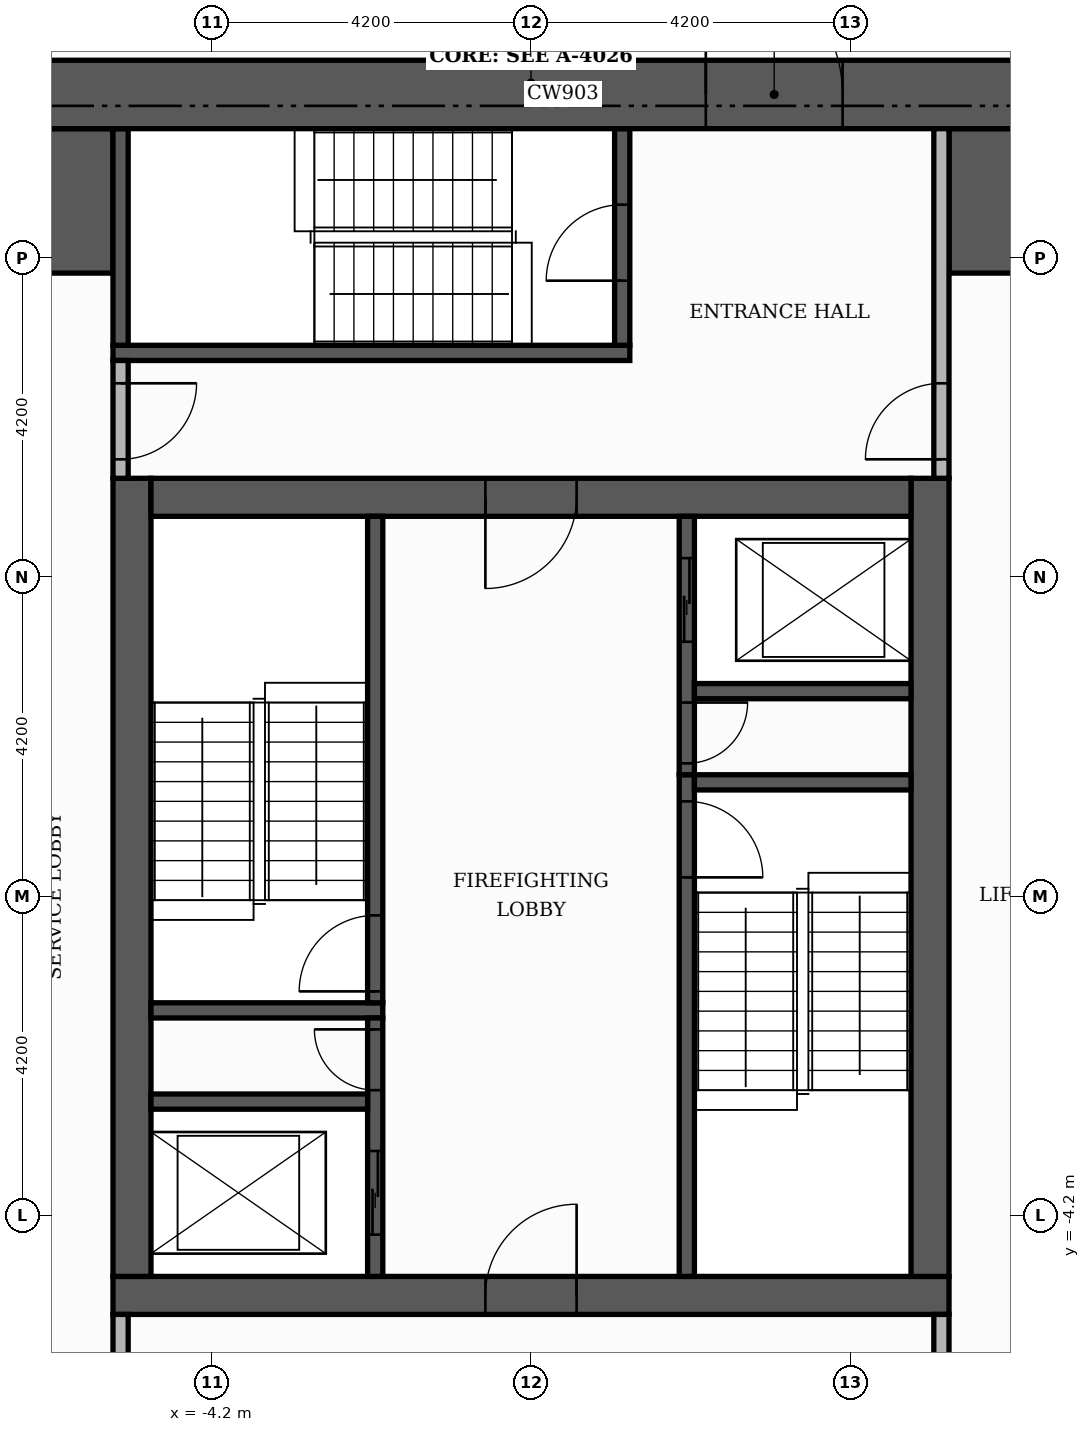
"""IFC4 building model, lengths in metres.
Left out: names, types, materials, properties, quantities, classifications, styles, units other than length and angle.
Written with IfcOpenShell. Run it as: python <this file> out.ifc"""

import sys

from ifc_helpers import new_model, si_unit, direction, frame, frame_2d, origin, place, context, subcontext, project, spatial, rectangle, extrude, element, fill, save


model = new_model("IFC4")
c1 = context("Model", 3, precision=1e-05, world=origin(), true_north=direction((0.0, 1.0)))
c2 = subcontext(c1, "Body", "Model", "MODEL_VIEW")
j1 = project(units=[si_unit("LENGTHUNIT", "METRE"), si_unit("PLANEANGLEUNIT", "RADIAN")], contexts=[c1])
p1 = place(None, origin())
s1 = spatial("IfcSite", under=j1, at=p1, CompositionType="ELEMENT")
p2 = place(p1, origin())
s2 = spatial("IfcBuilding", under=s1, at=p2, CompositionType="ELEMENT")
p3 = place(p2, frame((0.0, 0.0, 157.2)))
s3 = spatial("IfcBuildingStorey", under=s2, at=p3, CompositionType="ELEMENT", Elevation=157.2)
p4 = place(p3, frame((-5.5, -5.25, 0.0), z_axis=(0.0, 0.0, 1.0), x_axis=(1.0, 0.0, 0.0)))
e1 = element("IfcWall", 1, at=p4, inside=s3, PredefinedType="SHEAR", context=c2, shape_type="SweptSolid", body=[
    extrude(rectangle(XDim=11.0, YDim=0.5, at=frame_2d((5.5, 0.0))), origin(), (0.0, 0.0, 1.0), 3.48),
])
p5 = place(p4, frame((4.9, 0.0, 0.0)))
e2 = element("IfcOpeningElement", 2, at=p5, cuts=e1, PredefinedType="OPENING", context=c2, shape_type="SweptSolid", body=[
    extrude(rectangle(XDim=1.2, YDim=2.1, at=frame_2d((0.6, 1.05))), frame((0.0, 0.26, 0.0), z_axis=(0.0, -1.0, 0.0), x_axis=(1.0, 0.0, 0.0)), (0.0, 0.0, 1.0), 0.52),
])
for number, where, z_axis, x_axis in (
    (3, (-5.25, -5.0, 0.0), (0.0, 0.0, 1.0), (0.0, 1.0, 0.0)),
    (4, (5.25, -5.0, 0.0), (0.0, 0.0, 1.0), (0.0, 1.0, 0.0)),
):
    element("IfcWall", number, at=place(p3, frame(where, z_axis=z_axis, x_axis=x_axis)), inside=s3, PredefinedType="SHEAR", context=c2, shape_type="SweptSolid", body=[
        extrude(rectangle(XDim=10.5, YDim=0.5, at=frame_2d((5.25, 0.0))), origin(), (0.0, 0.0, 1.0), 3.48),
    ])
p6 = place(p3, frame((-5.0, 5.25, 0.0), z_axis=(0.0, 0.0, 1.0), x_axis=(1.0, 0.0, 0.0)))
e5 = element("IfcWall", 5, at=p6, inside=s3, PredefinedType="SHEAR", context=c2, shape_type="SweptSolid", body=[
    extrude(rectangle(XDim=10.0, YDim=0.5, at=frame_2d((5.0, 0.0))), origin(), (0.0, 0.0, 1.0), 3.48),
])
p7 = place(p6, frame((4.4, 0.0, 0.0)))
e6 = element("IfcOpeningElement", 6, at=p7, cuts=e5, PredefinedType="OPENING", context=c2, shape_type="SweptSolid", body=[
    extrude(rectangle(XDim=1.2, YDim=2.1, at=frame_2d((0.6, 1.05))), frame((0.0, 0.26, 0.0), z_axis=(0.0, -1.0, 0.0), x_axis=(1.0, 0.0, 0.0)), (0.0, 0.0, 1.0), 0.52),
])
for number, where, z_axis, x_axis in (
    (7, (-10.1, 9.15, 0.0), (0.0, 0.0, 1.0), (1.0, 0.0, 0.0)),
    (8, (5.5, 9.15, 0.0), (0.0, 0.0, 1.0), (1.0, 0.0, 0.0)),
):
    element("IfcWall", number, at=place(p3, frame(where, z_axis=z_axis, x_axis=x_axis)), inside=s3, PredefinedType="SHEAR", context=c2, shape_type="SweptSolid", body=[
        extrude(rectangle(XDim=4.6, YDim=1.9, at=frame_2d((2.3, 0.0))), origin(), (0.0, 0.0, 1.0), 3.48),
    ])
p8 = place(p3, frame((2.05, -5.0, 0.0), z_axis=(0.0, 0.0, 1.0), x_axis=(0.0, 1.0, 0.0)))
e9 = element("IfcWall", 9, at=p8, inside=s3, PredefinedType="SHEAR", context=c2, shape_type="SweptSolid", body=[
    extrude(rectangle(XDim=6.6, YDim=0.2, at=frame_2d((3.3, 0.0))), origin(), (0.0, 0.0, 1.0), 3.48),
])
p9 = place(p8, frame((5.25, 0.0, 0.0)))
e10 = element("IfcOpeningElement", 10, at=p9, cuts=e9, PredefinedType="OPENING", context=c2, shape_type="SweptSolid", body=[
    extrude(rectangle(XDim=1.0, YDim=2.1, at=frame_2d((0.5, 1.05))), frame((0.0, 0.11, 0.0), z_axis=(0.0, -1.0, 0.0), x_axis=(1.0, 0.0, 0.0)), (0.0, 0.0, 1.0), 0.22),
])
p10 = place(p3, frame((-5.0, -1.5, 0.0), z_axis=(0.0, 0.0, 1.0), x_axis=(1.0, 0.0, 0.0)))
e11 = element("IfcWall", 11, at=p10, inside=s3, PredefinedType="SHEAR", context=c2, shape_type="SweptSolid", body=[
    extrude(rectangle(XDim=3.05, YDim=0.2, at=frame_2d((1.525, 0.0))), origin(), (0.0, 0.0, 1.0), 3.48),
])
p11 = place(p3, frame((-2.05, -1.4, 0.0), z_axis=(0.0, 0.0, 1.0), x_axis=(0.0, 1.0, 0.0)))
e12 = element("IfcWall", 12, at=p11, inside=s3, PredefinedType="SHEAR", context=c2, shape_type="SweptSolid", body=[
    extrude(rectangle(XDim=6.4, YDim=0.2, at=frame_2d((3.2, 0.0))), origin(), (0.0, 0.0, 1.0), 3.48),
])
p12 = place(p11, frame((0.15, 0.0, 0.0)))
e13 = element("IfcOpeningElement", 13, at=p12, cuts=e12, PredefinedType="OPENING", context=c2, shape_type="SweptSolid", body=[
    extrude(rectangle(XDim=1.0, YDim=2.1, at=frame_2d((0.5, 1.05))), frame((0.0, 0.11, 0.0), z_axis=(0.0, -1.0, 0.0), x_axis=(1.0, 0.0, 0.0)), (0.0, 0.0, 1.0), 0.22),
])
p13 = place(p3, frame((2.15, 1.5, 0.0), z_axis=(0.0, 0.0, 1.0), x_axis=(1.0, 0.0, 0.0)))
e14 = element("IfcWall", 14, at=p13, inside=s3, PredefinedType="SHEAR", context=c2, shape_type="SweptSolid", body=[
    extrude(rectangle(XDim=2.85, YDim=0.2, at=frame_2d((1.425, 0.0))), origin(), (0.0, 0.0, 1.0), 3.48),
])
p14 = place(p3, frame((-5.5, 7.15, 0.0), z_axis=(0.0, 0.0, 1.0), x_axis=(1.0, 0.0, 0.0)))
e15 = element("IfcWall", 15, at=p14, inside=s3, PredefinedType="SHEAR", context=c2, shape_type="SweptSolid", body=[
    extrude(rectangle(XDim=6.8, YDim=0.2, at=frame_2d((3.4, 0.0))), origin(), (0.0, 0.0, 1.0), 3.48),
])
p15 = place(p3, frame((-5.4, 7.25, 0.0), z_axis=(0.0, 0.0, 1.0), x_axis=(0.0, 1.0, 0.0)))
e16 = element("IfcWall", 16, at=p15, inside=s3, PredefinedType="SHEAR", context=c2, shape_type="SweptSolid", body=[
    extrude(rectangle(XDim=2.85, YDim=0.2, at=frame_2d((1.425, 0.0))), origin(), (0.0, 0.0, 1.0), 3.48),
])
p16 = place(p3, frame((1.2, 7.25, 0.0), z_axis=(0.0, 0.0, 1.0), x_axis=(0.0, 1.0, 0.0)))
e17 = element("IfcWall", 17, at=p16, inside=s3, PredefinedType="SHEAR", context=c2, shape_type="SweptSolid", body=[
    extrude(rectangle(XDim=2.85, YDim=0.2, at=frame_2d((1.425, 0.0))), origin(), (0.0, 0.0, 1.0), 3.48),
])
p17 = place(p16, frame((0.85, 0.0, 0.0)))
e18 = element("IfcOpeningElement", 18, at=p17, cuts=e17, PredefinedType="OPENING", context=c2, shape_type="SweptSolid", body=[
    extrude(rectangle(XDim=1.0, YDim=2.1, at=frame_2d((0.5, 1.05))), frame((0.0, 0.11, 0.0), z_axis=(0.0, -1.0, 0.0), x_axis=(1.0, 0.0, 0.0)), (0.0, 0.0, 1.0), 0.22),
])
p18 = place(p3, frame((-2.05, -5.0, 0.0), z_axis=(0.0, 0.0, 1.0), x_axis=(0.0, 1.0, 0.0)))
e19 = element("IfcWall", 19, at=p18, inside=s3, PredefinedType="SHEAR", context=c2, shape_type="SweptSolid", body=[
    extrude(rectangle(XDim=3.4, YDim=0.2, at=frame_2d((1.7, 0.0))), origin(), (0.0, 0.0, 1.0), 3.48),
])
p19 = place(p18, frame((0.55, 0.0, 0.0)))
e20 = element("IfcOpeningElement", 20, at=p19, cuts=e19, PredefinedType="OPENING", context=c2, shape_type="SweptSolid", body=[
    extrude(rectangle(XDim=1.1, YDim=2.1, at=frame_2d((0.55, 1.05))), frame((0.0, 0.11, 0.0), z_axis=(0.0, -1.0, 0.0), x_axis=(1.0, 0.0, 0.0)), (0.0, 0.0, 1.0), 0.22),
])
p20 = place(p18, frame((2.45, 0.0, 0.0)))
e21 = element("IfcOpeningElement", 21, at=p20, cuts=e19, PredefinedType="OPENING", context=c2, shape_type="SweptSolid", body=[
    extrude(rectangle(XDim=0.8, YDim=2.1, at=frame_2d((0.4, 1.05))), frame((0.0, 0.11, 0.0), z_axis=(0.0, -1.0, 0.0), x_axis=(1.0, 0.0, 0.0)), (0.0, 0.0, 1.0), 0.22),
])
p21 = place(p3, frame((-5.0, -2.7, 0.0), z_axis=(0.0, 0.0, 1.0), x_axis=(1.0, 0.0, 0.0)))
e22 = element("IfcWall", 22, at=p21, inside=s3, PredefinedType="SHEAR", context=c2, shape_type="SweptSolid", body=[
    extrude(rectangle(XDim=2.85, YDim=0.2, at=frame_2d((1.425, 0.0))), origin(), (0.0, 0.0, 1.0), 3.48),
])
p22 = place(p3, frame((2.05, 1.6, 0.0), z_axis=(0.0, 0.0, 1.0), x_axis=(0.0, 1.0, 0.0)))
e23 = element("IfcWall", 23, at=p22, inside=s3, PredefinedType="SHEAR", context=c2, shape_type="SweptSolid", body=[
    extrude(rectangle(XDim=3.4, YDim=0.2, at=frame_2d((1.7, 0.0))), origin(), (0.0, 0.0, 1.0), 3.48),
])
p23 = place(p22, frame((1.75, 0.0, 0.0)))
e24 = element("IfcOpeningElement", 24, at=p23, cuts=e23, PredefinedType="OPENING", context=c2, shape_type="SweptSolid", body=[
    extrude(rectangle(XDim=1.1, YDim=2.1, at=frame_2d((0.55, 1.05))), frame((0.0, 0.11, 0.0), z_axis=(0.0, -1.0, 0.0), x_axis=(1.0, 0.0, 0.0)), (0.0, 0.0, 1.0), 0.22),
])
p24 = place(p22, frame((0.15, 0.0, 0.0)))
e25 = element("IfcOpeningElement", 25, at=p24, cuts=e23, PredefinedType="OPENING", context=c2, shape_type="SweptSolid", body=[
    extrude(rectangle(XDim=0.8, YDim=2.1, at=frame_2d((0.4, 1.05))), frame((0.0, 0.11, 0.0), z_axis=(0.0, -1.0, 0.0), x_axis=(1.0, 0.0, 0.0)), (0.0, 0.0, 1.0), 0.22),
])
p25 = place(p3, frame((2.15, 2.7, 0.0), z_axis=(0.0, 0.0, 1.0), x_axis=(1.0, 0.0, 0.0)))
e26 = element("IfcWall", 26, at=p25, inside=s3, PredefinedType="SHEAR", context=c2, shape_type="SweptSolid", body=[
    extrude(rectangle(XDim=2.85, YDim=0.2, at=frame_2d((1.425, 0.0))), origin(), (0.0, 0.0, 1.0), 3.48),
])
p26 = place(p3, frame((-11.0, 10.55, 0.0), z_axis=(0.0, 0.0, 1.0), x_axis=(1.0, 0.0, 0.0)))
e27 = element("IfcWall", 27, at=p26, inside=s3, PredefinedType="SHEAR", context=c2, shape_type="SweptSolid", body=[
    extrude(rectangle(XDim=22.0, YDim=0.9, at=frame_2d((11.0, 0.0))), origin(), (0.0, 0.0, 1.0), 3.48),
])
p27 = place(p26, frame((13.3, 0.0, 0.0)))
e28 = element("IfcOpeningElement", 28, at=p27, cuts=e27, PredefinedType="OPENING", context=c2, shape_type="SweptSolid", body=[
    extrude(rectangle(XDim=1.8, YDim=2.2, at=frame_2d((0.9, 1.1))), frame((0.0, 0.46, 0.0), z_axis=(0.0, -1.0, 0.0), x_axis=(1.0, 0.0, 0.0)), (0.0, 0.0, 1.0), 0.92),
])
p28 = place(p3, frame((-5.4, -10.1, 0.0), z_axis=(0.0, 0.0, 1.0), x_axis=(0.0, 1.0, 0.0)))
e29 = element("IfcWall", 29, at=p28, inside=s3, PredefinedType="PARTITIONING", context=c2, shape_type="SweptSolid", body=[
    extrude(rectangle(XDim=4.6, YDim=0.2, at=frame_2d((2.3, 0.0))), origin(), (0.0, 0.0, 1.0), 3.48),
])
p29 = place(p28, frame((2.9, 0.0, 0.0)))
e30 = element("IfcOpeningElement", 30, at=p29, cuts=e29, PredefinedType="OPENING", context=c2, shape_type="SweptSolid", body=[
    extrude(rectangle(XDim=1.0, YDim=2.1, at=frame_2d((0.5, 1.05))), frame((0.0, 0.11, 0.0), z_axis=(0.0, -1.0, 0.0), x_axis=(1.0, 0.0, 0.0)), (0.0, 0.0, 1.0), 0.22),
])
p30 = place(p3, frame((5.4, -10.1, 0.0), z_axis=(0.0, 0.0, 1.0), x_axis=(0.0, 1.0, 0.0)))
e31 = element("IfcWall", 31, at=p30, inside=s3, PredefinedType="PARTITIONING", context=c2, shape_type="SweptSolid", body=[
    extrude(rectangle(XDim=4.6, YDim=0.2, at=frame_2d((2.3, 0.0))), origin(), (0.0, 0.0, 1.0), 3.48),
])
p31 = place(p30, frame((2.9, 0.0, 0.0)))
e32 = element("IfcOpeningElement", 32, at=p31, cuts=e31, PredefinedType="OPENING", context=c2, shape_type="SweptSolid", body=[
    extrude(rectangle(XDim=1.0, YDim=2.1, at=frame_2d((0.5, 1.05))), frame((0.0, 0.11, 0.0), z_axis=(0.0, -1.0, 0.0), x_axis=(1.0, 0.0, 0.0)), (0.0, 0.0, 1.0), 0.22),
])
p32 = place(p3, frame((-5.4, 5.5, 0.0), z_axis=(0.0, 0.0, 1.0), x_axis=(0.0, 1.0, 0.0)))
e33 = element("IfcWall", 33, at=p32, inside=s3, PredefinedType="PARTITIONING", context=c2, shape_type="SweptSolid", body=[
    extrude(rectangle(XDim=1.55, YDim=0.2, at=frame_2d((0.775, 0.0))), origin(), (0.0, 0.0, 1.0), 3.48),
])
p33 = place(p32, frame((0.25, 0.0, 0.0)))
e34 = element("IfcOpeningElement", 34, at=p33, cuts=e33, PredefinedType="OPENING", context=c2, shape_type="SweptSolid", body=[
    extrude(rectangle(XDim=1.0, YDim=2.1, at=frame_2d((0.5, 1.05))), frame((0.0, 0.11, 0.0), z_axis=(0.0, -1.0, 0.0), x_axis=(1.0, 0.0, 0.0)), (0.0, 0.0, 1.0), 0.22),
])
p34 = place(p3, frame((5.4, 5.5, 0.0), z_axis=(0.0, 0.0, 1.0), x_axis=(0.0, 1.0, 0.0)))
e35 = element("IfcWall", 35, at=p34, inside=s3, PredefinedType="PARTITIONING", context=c2, shape_type="SweptSolid", body=[
    extrude(rectangle(XDim=4.6, YDim=0.2, at=frame_2d((2.3, 0.0))), origin(), (0.0, 0.0, 1.0), 3.48),
])
p35 = place(p34, frame((0.25, 0.0, 0.0)))
e36 = element("IfcOpeningElement", 36, at=p35, cuts=e35, PredefinedType="OPENING", context=c2, shape_type="SweptSolid", body=[
    extrude(rectangle(XDim=1.0, YDim=2.1, at=frame_2d((0.5, 1.05))), frame((0.0, 0.11, 0.0), z_axis=(0.0, -1.0, 0.0), x_axis=(1.0, 0.0, 0.0)), (0.0, 0.0, 1.0), 0.22),
])
p36 = place(p23, origin())
e37 = element("IfcDoor", 37, at=p36, inside=s3, OperationType="SLIDING_TO_LEFT", PredefinedType="DOOR", context=c2, shape_type="SweptSolid", body=[
    extrude(rectangle(XDim=1.1, YDim=2.1, at=frame_2d((0.55, 1.05))), frame((0.0, 0.025, 0.0), z_axis=(0.0, -1.0, 0.0), x_axis=(1.0, 0.0, 0.0)), (0.0, 0.0, 1.0), 0.05),
])
fill(e24, e37)
p37 = place(p19, origin())
e38 = element("IfcDoor", 38, at=p37, inside=s3, OperationType="SLIDING_TO_LEFT", PredefinedType="DOOR", context=c2, shape_type="SweptSolid", body=[
    extrude(rectangle(XDim=1.1, YDim=2.1, at=frame_2d((0.55, 1.05))), frame((0.0, 0.025, 0.0), z_axis=(0.0, -1.0, 0.0), x_axis=(1.0, 0.0, 0.0)), (0.0, 0.0, 1.0), 0.05),
])
fill(e20, e38)
p38 = place(p12, origin())
e39 = element("IfcDoor", 39, at=p38, inside=s3, OperationType="SINGLE_SWING_LEFT", PredefinedType="DOOR", context=c2, shape_type="SweptSolid", body=[
    extrude(rectangle(XDim=1.0, YDim=2.1, at=frame_2d((0.5, 1.05))), frame((0.0, 0.025, 0.0), z_axis=(0.0, -1.0, 0.0), x_axis=(1.0, 0.0, 0.0)), (0.0, 0.0, 1.0), 0.05),
])
fill(e13, e39)
p39 = place(p9, frame((1.0, 0.0, 0.0), z_axis=(0.0, 0.0, 1.0), x_axis=(-1.0, 0.0, 0.0)))
e40 = element("IfcDoor", 40, at=p39, inside=s3, OperationType="SINGLE_SWING_LEFT", PredefinedType="DOOR", context=c2, shape_type="SweptSolid", body=[
    extrude(rectangle(XDim=1.0, YDim=2.1, at=frame_2d((0.5, 1.05))), frame((0.0, 0.025, 0.0), z_axis=(0.0, -1.0, 0.0), x_axis=(1.0, 0.0, 0.0)), (0.0, 0.0, 1.0), 0.05),
])
fill(e10, e40)
p40 = place(p24, frame((0.8, 0.0, 0.0), z_axis=(0.0, 0.0, 1.0), x_axis=(-1.0, 0.0, 0.0)))
e41 = element("IfcDoor", 41, at=p40, inside=s3, OperationType="SINGLE_SWING_RIGHT", PredefinedType="DOOR", context=c2, shape_type="SweptSolid", body=[
    extrude(rectangle(XDim=0.8, YDim=2.1, at=frame_2d((0.4, 1.05))), frame((0.0, 0.025, 0.0), z_axis=(0.0, -1.0, 0.0), x_axis=(1.0, 0.0, 0.0)), (0.0, 0.0, 1.0), 0.05),
])
fill(e25, e41)
p41 = place(p20, origin())
e42 = element("IfcDoor", 42, at=p41, inside=s3, OperationType="SINGLE_SWING_RIGHT", PredefinedType="DOOR", context=c2, shape_type="SweptSolid", body=[
    extrude(rectangle(XDim=0.8, YDim=2.1, at=frame_2d((0.4, 1.05))), frame((0.0, 0.025, 0.0), z_axis=(0.0, -1.0, 0.0), x_axis=(1.0, 0.0, 0.0)), (0.0, 0.0, 1.0), 0.05),
])
fill(e21, e42)
p42 = place(p7, frame((1.2, 0.0, 0.0), z_axis=(0.0, 0.0, 1.0), x_axis=(-1.0, 0.0, 0.0)))
e43 = element("IfcDoor", 43, at=p42, inside=s3, OperationType="SINGLE_SWING_LEFT", PredefinedType="DOOR", context=c2, shape_type="SweptSolid", body=[
    extrude(rectangle(XDim=1.2, YDim=2.1, at=frame_2d((0.6, 1.05))), frame((0.0, 0.025, 0.0), z_axis=(0.0, -1.0, 0.0), x_axis=(1.0, 0.0, 0.0)), (0.0, 0.0, 1.0), 0.05),
])
fill(e6, e43)
p43 = place(p5, origin())
e44 = element("IfcDoor", 44, at=p43, inside=s3, OperationType="SINGLE_SWING_RIGHT", PredefinedType="DOOR", context=c2, shape_type="SweptSolid", body=[
    extrude(rectangle(XDim=1.2, YDim=2.1, at=frame_2d((0.6, 1.05))), frame((0.0, 0.025, 0.0), z_axis=(0.0, -1.0, 0.0), x_axis=(1.0, 0.0, 0.0)), (0.0, 0.0, 1.0), 0.05),
])
fill(e2, e44)
p44 = place(p17, origin())
e45 = element("IfcDoor", 45, at=p44, inside=s3, OperationType="SINGLE_SWING_LEFT", PredefinedType="DOOR", context=c2, shape_type="SweptSolid", body=[
    extrude(rectangle(XDim=1.0, YDim=2.1, at=frame_2d((0.5, 1.05))), frame((0.0, 0.025, 0.0), z_axis=(0.0, -1.0, 0.0), x_axis=(1.0, 0.0, 0.0)), (0.0, 0.0, 1.0), 0.05),
])
fill(e18, e45)
p45 = place(p33, frame((1.0, 0.0, 0.0), z_axis=(0.0, 0.0, 1.0), x_axis=(-1.0, 0.0, 0.0)))
e46 = element("IfcDoor", 46, at=p45, inside=s3, OperationType="SINGLE_SWING_RIGHT", PredefinedType="DOOR", context=c2, shape_type="SweptSolid", body=[
    extrude(rectangle(XDim=1.0, YDim=2.1, at=frame_2d((0.5, 1.05))), frame((0.0, 0.025, 0.0), z_axis=(0.0, -1.0, 0.0), x_axis=(1.0, 0.0, 0.0)), (0.0, 0.0, 1.0), 0.05),
])
fill(e34, e46)
p46 = place(p35, origin())
e47 = element("IfcDoor", 47, at=p46, inside=s3, OperationType="SINGLE_SWING_LEFT", PredefinedType="DOOR", context=c2, shape_type="SweptSolid", body=[
    extrude(rectangle(XDim=1.0, YDim=2.1, at=frame_2d((0.5, 1.05))), frame((0.0, 0.025, 0.0), z_axis=(0.0, -1.0, 0.0), x_axis=(1.0, 0.0, 0.0)), (0.0, 0.0, 1.0), 0.05),
])
fill(e36, e47)
p47 = place(p27, origin())
e48 = element("IfcDoor", 48, at=p47, inside=s3, OperationType="DOUBLE_DOOR_SINGLE_SWING", PredefinedType="DOOR", context=c2, shape_type="SweptSolid", body=[
    extrude(rectangle(XDim=1.8, YDim=2.2, at=frame_2d((0.9, 1.1))), frame((0.0, 0.025, 0.0), z_axis=(0.0, -1.0, 0.0), x_axis=(1.0, 0.0, 0.0)), (0.0, 0.0, 1.0), 0.05),
])
fill(e28, e48)
save(model, sys.argv[1])
